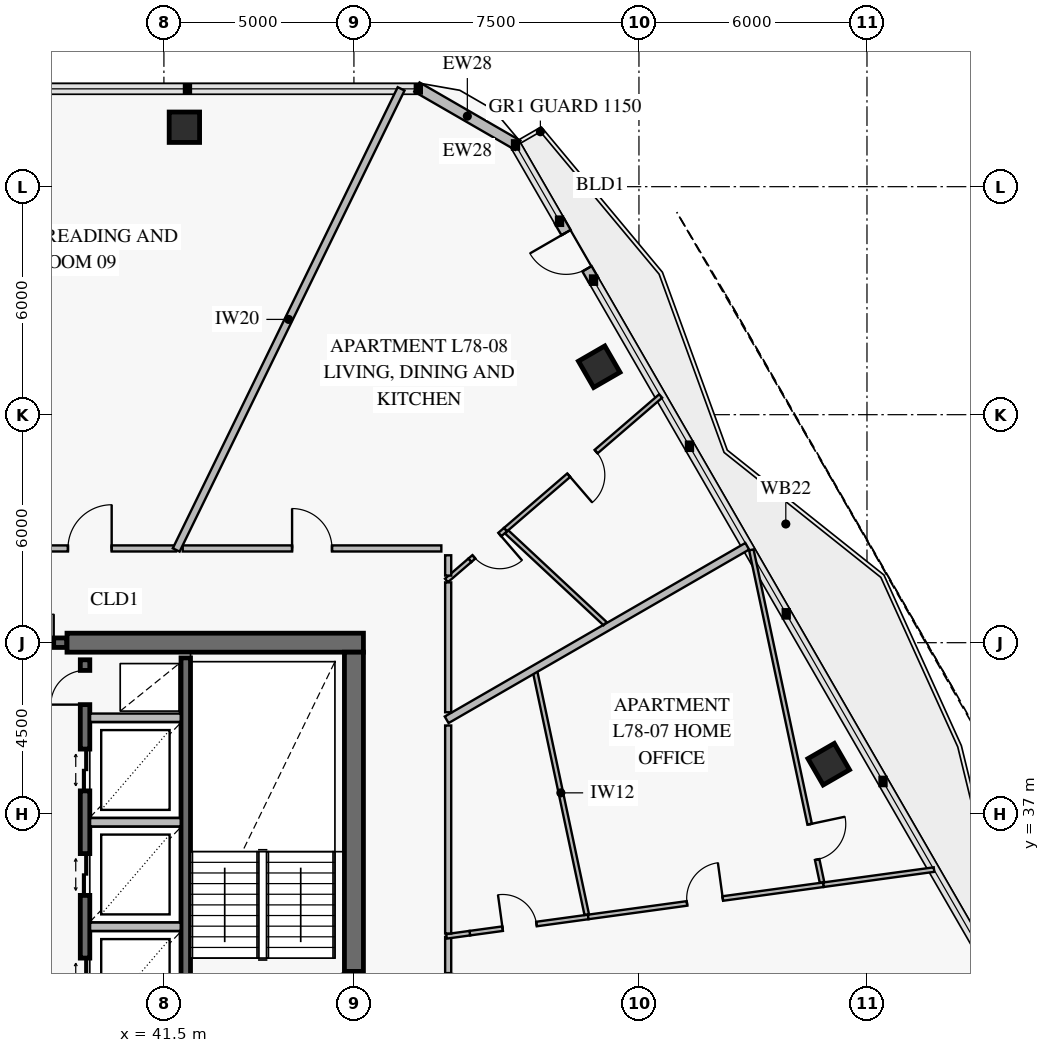
"""IFC4 building model, lengths in metres.
Left out: names, types, materials, properties, quantities, classifications, styles, units other than length and angle.
Written with IfcOpenShell. Run it as: python <this file> out.ifc"""

import sys

from ifc_helpers import new_model, si_unit, direction, frame, frame_2d, origin, origin_2d, place, context, subcontext, project, spatial, rectangle, extrude, element, fill, save


model = new_model("IFC4")
c1 = context("Model", 3, precision=1e-05, world=origin(), true_north=direction((0.0, 1.0)))
c2 = subcontext(c1, "Body", "Model", "MODEL_VIEW")
j1 = project(units=[si_unit("LENGTHUNIT", "METRE"), si_unit("PLANEANGLEUNIT", "RADIAN")], contexts=[c1])
p1 = place(None, origin())
s1 = spatial("IfcSite", under=j1, at=p1, CompositionType="ELEMENT")
p2 = place(p1, origin())
s2 = spatial("IfcBuilding", under=s1, at=p2, CompositionType="ELEMENT")
p3 = place(p2, frame((0.0, 0.0, 308.2)))
s3 = spatial("IfcBuildingStorey", under=s2, at=p3, CompositionType="ELEMENT", Elevation=308.2)
p4 = place(p3, frame((46.75, 41.5, 0.0), z_axis=(0.0, 0.0, 1.0), x_axis=(-1.0, 0.0, 0.0)))
e1 = element("IfcWall", 1, at=p4, inside=s3, PredefinedType="SHEAR", context=c2, shape_type="SweptSolid", body=[
    extrude(rectangle(XDim=7.8, YDim=0.5, at=frame_2d((3.9, 0.0))), origin(), (0.0, 0.0, 1.0), 3.8),
])
p5 = place(p3, frame((46.5, 22.75, 0.0), z_axis=(0.0, 0.0, 1.0), x_axis=(0.0, 1.0, 0.0)))
e2 = element("IfcWall", 2, at=p5, inside=s3, PredefinedType="SHEAR", context=c2, shape_type="SweptSolid", body=[
    extrude(rectangle(XDim=18.5, YDim=0.5, at=frame_2d((9.25, 0.0))), origin(), (0.0, 0.0, 1.0), 3.8),
])
p6 = place(p5, frame((9.0, 0.0, 0.0)))
e3 = element("IfcOpeningElement", 3, at=p6, cuts=e2, PredefinedType="OPENING", context=c2, shape_type="SweptSolid", body=[
    extrude(rectangle(XDim=1.1, YDim=2.15, at=frame_2d((0.55, 1.075))), frame((0.0, 0.262, 0.0), z_axis=(0.0, -1.0, 0.0), x_axis=(1.0, 0.0, 0.0)), (0.0, 0.0, 1.0), 0.524),
])
for number, where, z_axis, x_axis in (
    (4, (58.993, 38.302, 0.0), (0.0, 0.0, 1.0), (-0.5, 0.866, 0.0)),
    (5, (52.955, 48.762, 0.0), (0.0, 0.0, 1.0), (-0.5, 0.866, 0.0)),
    (6, (42.039, 55.064, 0.0), (0.0, 0.0, 1.0), (-1.0, 0.0, 0.0)),
):
    element("IfcColumn", number, at=place(p3, frame(where, z_axis=z_axis, x_axis=x_axis)), inside=s3, PredefinedType="COLUMN", context=c2, shape_type="SweptSolid", body=[
        extrude(rectangle(XDim=0.8, YDim=0.8, at=origin_2d()), origin(), (0.0, 0.0, 1.0), 3.55),
    ])
p7 = place(p3, frame((48.157, 56.122, 0.0), z_axis=(0.0, 0.0, 1.0), x_axis=(0.866023752521, -0.50000286006, 0.0)))
e7 = element("IfcWall", 7, at=p7, inside=s3, PredefinedType="SOLIDWALL", context=c2, shape_type="SweptSolid", body=[
    extrude(rectangle(XDim=3.065, YDim=0.28, at=frame_2d((1.532, 0.0))), origin(), (0.0, 0.0, 1.0), 3.55),
])
p8 = place(p3, frame((51.91, 52.591, 0.0), z_axis=(0.0, 0.0, 1.0), x_axis=(0.499982180423, -0.866035691677, 0.0)))
e8 = element("IfcWall", 8, at=p8, inside=s3, PredefinedType="SOLIDWALL", context=c2, shape_type="SweptSolid", body=[
    extrude(rectangle(XDim=1.79, YDim=0.28, at=frame_2d((0.895, 0.0))), origin(), (0.0, 0.0, 1.0), 3.55),
])
p9 = place(p8, frame((0.345, 0.0, 0.0)))
e9 = element("IfcOpeningElement", 9, at=p9, cuts=e8, PredefinedType="OPENING", context=c2, shape_type="SweptSolid", body=[
    extrude(rectangle(XDim=1.1, YDim=2.2, at=frame_2d((0.55, 1.1))), frame((0.0, 0.152, 0.0), z_axis=(0.0, -1.0, 0.0), x_axis=(1.0, 0.0, 0.0)), (0.0, 0.0, 1.0), 0.304),
])
p10 = place(p3, frame((36.76, 41.5, 0.0), z_axis=(0.0, 0.0, 1.0), x_axis=(1.0, 0.0, 0.0)))
e10 = element("IfcWall", 10, at=p10, inside=s3, PredefinedType="SOLIDWALL", context=c2, shape_type="SweptSolid", body=[
    extrude(rectangle(XDim=2.18, YDim=0.25, at=frame_2d((1.09, 0.0))), origin(), (0.0, 0.0, 1.0), 3.8),
])
p11 = place(p10, frame((0.34, 0.0, 0.0)))
e11 = element("IfcOpeningElement", 11, at=p11, cuts=e10, PredefinedType="OPENING", context=c2, shape_type="SweptSolid", body=[
    extrude(rectangle(XDim=1.5, YDim=2.15, at=frame_2d((0.75, 1.075))), frame((0.0, 0.137, 0.0), z_axis=(0.0, -1.0, 0.0), x_axis=(1.0, 0.0, 0.0)), (0.0, 0.0, 1.0), 0.274),
])
p12 = place(p3, frame((42.075, 31.4, 0.0), z_axis=(0.0, 0.0, 1.0), x_axis=(0.0, 1.0, 0.0)))
e12 = element("IfcWall", 12, at=p12, inside=s3, PredefinedType="SOLIDWALL", context=c2, shape_type="SweptSolid", body=[
    extrude(rectangle(XDim=9.7, YDim=0.25, at=frame_2d((4.85, 0.0))), origin(), (0.0, 0.0, 1.0), 3.8),
])
p13 = place(p3, frame((39.425, 31.4, 0.0), z_axis=(0.0, 0.0, 1.0), x_axis=(0.0, 1.0, 0.0)))
e13 = element("IfcWall", 13, at=p13, inside=s3, PredefinedType="SOLIDWALL", context=c2, shape_type="SweptSolid", body=[
    extrude(rectangle(XDim=9.65, YDim=0.25, at=frame_2d((4.825, 0.0))), origin(), (0.0, 0.0, 1.0), 3.8),
])
p14 = place(p13, frame((0.7, 0.0, 0.0)))
e14 = element("IfcOpeningElement", 14, at=p14, cuts=e13, PredefinedType="OPENING", context=c2, shape_type="SweptSolid", body=[
    extrude(rectangle(XDim=1.1, YDim=2.2, at=frame_2d((0.55, 1.1))), frame((0.0, 0.137, 0.0), z_axis=(0.0, -1.0, 0.0), x_axis=(1.0, 0.0, 0.0)), (0.0, 0.0, 1.0), 0.274),
])
p15 = place(p13, frame((3.45, 0.0, 0.0)))
e15 = element("IfcOpeningElement", 15, at=p15, cuts=e13, PredefinedType="OPENING", context=c2, shape_type="SweptSolid", body=[
    extrude(rectangle(XDim=1.1, YDim=2.2, at=frame_2d((0.55, 1.1))), frame((0.0, 0.137, 0.0), z_axis=(0.0, -1.0, 0.0), x_axis=(1.0, 0.0, 0.0)), (0.0, 0.0, 1.0), 0.274),
])
p16 = place(p13, frame((6.2, 0.0, 0.0)))
e16 = element("IfcOpeningElement", 16, at=p16, cuts=e13, PredefinedType="OPENING", context=c2, shape_type="SweptSolid", body=[
    extrude(rectangle(XDim=1.1, YDim=2.2, at=frame_2d((0.55, 1.1))), frame((0.0, 0.137, 0.0), z_axis=(0.0, -1.0, 0.0), x_axis=(1.0, 0.0, 0.0)), (0.0, 0.0, 1.0), 0.274),
])
p17 = place(p13, frame((8.47, 0.0, 0.0)))
e17 = element("IfcOpeningElement", 17, at=p17, cuts=e13, PredefinedType="OPENING", context=c2, shape_type="SweptSolid", body=[
    extrude(rectangle(XDim=0.9, YDim=2.1, at=frame_2d((0.45, 1.05))), frame((0.0, 0.137, 0.0), z_axis=(0.0, -1.0, 0.0), x_axis=(1.0, 0.0, 0.0)), (0.0, 0.0, 1.0), 0.274),
])
p18 = place(p3, frame((49.55, 33.856, 0.0), z_axis=(0.0, 0.0, 1.0), x_axis=(0.990754403165, 0.135667654987, 0.0)))
e18 = element("IfcWall", 18, at=p18, inside=s3, PredefinedType="PARTITIONING", context=c2, shape_type="SweptSolid", body=[
    extrude(rectangle(XDim=3.144, YDim=0.12, at=frame_2d((1.572, 0.0))), origin(), (0.0, 0.0, 1.0), 3.55),
])
p19 = place(p18, frame((0.87, 0.0, 0.0)))
e19 = element("IfcOpeningElement", 19, at=p19, cuts=e18, PredefinedType="OPENING", context=c2, shape_type="SweptSolid", body=[
    extrude(rectangle(XDim=0.9, YDim=2.1, at=frame_2d((0.45, 1.05))), frame((0.0, 0.072, 0.0), z_axis=(0.0, -1.0, 0.0), x_axis=(1.0, 0.0, 0.0)), (0.0, 0.0, 1.0), 0.144),
])
p20 = place(p3, frame((52.665, 34.283, 0.0), z_axis=(0.0, 0.0, 1.0), x_axis=(0.990745092284, 0.135735633182, 0.0)))
e20 = element("IfcWall", 20, at=p20, inside=s3, PredefinedType="PARTITIONING", context=c2, shape_type="SweptSolid", body=[
    extrude(rectangle(XDim=6.249, YDim=0.12, at=frame_2d((3.124, 0.0))), origin(), (0.0, 0.0, 1.0), 3.55),
])
p21 = place(p20, frame((2.624, 0.0, 0.0)))
e21 = element("IfcOpeningElement", 21, at=p21, cuts=e20, PredefinedType="OPENING", context=c2, shape_type="SweptSolid", body=[
    extrude(rectangle(XDim=0.95, YDim=2.1, at=frame_2d((0.475, 1.05))), frame((0.0, 0.072, 0.0), z_axis=(0.0, -1.0, 0.0), x_axis=(1.0, 0.0, 0.0)), (0.0, 0.0, 1.0), 0.144),
])
p22 = place(p3, frame((58.817, 35.194, 0.0), z_axis=(0.0, 0.0, 1.0), x_axis=(-0.20790706988, 0.978148582933, 0.0)))
e22 = element("IfcWall", 22, at=p22, inside=s3, PredefinedType="PARTITIONING", context=c2, shape_type="SweptSolid", body=[
    extrude(rectangle(XDim=8.945, YDim=0.12, at=frame_2d((4.472, 0.0))), origin(), (0.0, 0.0, 1.0), 2.97),
])
p23 = place(p22, frame((0.613, 0.0, 0.0)))
e23 = element("IfcOpeningElement", 23, at=p23, cuts=e22, PredefinedType="OPENING", context=c2, shape_type="SweptSolid", body=[
    extrude(rectangle(XDim=0.95, YDim=2.1, at=frame_2d((0.475, 1.05))), frame((0.0, 0.072, 0.0), z_axis=(0.0, -1.0, 0.0), x_axis=(1.0, 0.0, 0.0)), (0.0, 0.0, 1.0), 0.144),
])
p24 = place(p3, frame((48.98, 30.8, 0.0), z_axis=(0.0, 0.0, 1.0), x_axis=(0.0, 1.0, 0.0)))
e24 = element("IfcWall", 24, at=p24, inside=s3, PredefinedType="PARTITIONING", context=c2, shape_type="SweptSolid", body=[
    extrude(rectangle(XDim=2.958, YDim=0.16, at=frame_2d((1.479, 0.0))), origin(), (0.0, 0.0, 1.0), 3.55),
])
p25 = place(p24, frame((0.954, 0.0, 0.0)))
e25 = element("IfcOpeningElement", 25, at=p25, cuts=e24, PredefinedType="OPENING", context=c2, shape_type="SweptSolid", body=[
    extrude(rectangle(XDim=1.05, YDim=2.15, at=frame_2d((0.525, 1.075))), frame((0.0, 0.092, 0.0), z_axis=(0.0, -1.0, 0.0), x_axis=(1.0, 0.0, 0.0)), (0.0, 0.0, 1.0), 0.184),
])
p26 = place(p3, frame((49.55, 43.667, 0.0), z_axis=(0.0, 0.0, 1.0), x_axis=(0.757782315792, 0.652507442006, 0.0)))
e26 = element("IfcWall", 26, at=p26, inside=s3, PredefinedType="PARTITIONING", context=c2, shape_type="SweptSolid", body=[
    extrude(rectangle(XDim=1.241, YDim=0.12, at=frame_2d((0.62, 0.0))), origin(), (0.0, 0.0, 1.0), 3.2),
])
p27 = place(p26, frame((0.14, 0.0, 0.0)))
e27 = element("IfcOpeningElement", 27, at=p27, cuts=e26, PredefinedType="OPENING", context=c2, shape_type="SweptSolid", body=[
    extrude(rectangle(XDim=0.9, YDim=2.1, at=frame_2d((0.45, 1.05))), frame((0.0, 0.072, 0.0), z_axis=(0.0, -1.0, 0.0), x_axis=(1.0, 0.0, 0.0)), (0.0, 0.0, 1.0), 0.144),
])
p28 = place(p3, frame((50.49, 44.477, 0.0), z_axis=(0.0, 0.0, 1.0), x_axis=(0.757798689284, 0.65248842635, 0.0)))
e28 = element("IfcWall", 28, at=p28, inside=s3, PredefinedType="PARTITIONING", context=c2, shape_type="SweptSolid", body=[
    extrude(rectangle(XDim=5.385, YDim=0.12, at=frame_2d((2.693, 0.0))), origin(), (0.0, 0.0, 1.0), 2.97),
])
p29 = place(p28, frame((2.193, 0.0, 0.0)))
e29 = element("IfcOpeningElement", 29, at=p29, cuts=e28, PredefinedType="OPENING", context=c2, shape_type="SweptSolid", body=[
    extrude(rectangle(XDim=0.95, YDim=2.1, at=frame_2d((0.475, 1.05))), frame((0.0, 0.072, 0.0), z_axis=(0.0, -1.0, 0.0), x_axis=(1.0, 0.0, 0.0)), (0.0, 0.0, 1.0), 0.144),
])
p30 = place(p3, frame((48.8, 43.98, 0.0), z_axis=(0.0, 0.0, 1.0), x_axis=(-1.0, 0.0, 0.0)))
e30 = element("IfcWall", 30, at=p30, inside=s3, PredefinedType="PARTITIONING", context=c2, shape_type="SweptSolid", body=[
    extrude(rectangle(XDim=6.805, YDim=0.16, at=frame_2d((3.402, 0.0))), origin(), (0.0, 0.0, 1.0), 3.0),
])
p31 = place(p30, frame((2.877, 0.0, 0.0)))
e31 = element("IfcOpeningElement", 31, at=p31, cuts=e30, PredefinedType="OPENING", context=c2, shape_type="SweptSolid", body=[
    extrude(rectangle(XDim=1.05, YDim=2.15, at=frame_2d((0.525, 1.075))), frame((0.0, 0.092, 0.0), z_axis=(0.0, -1.0, 0.0), x_axis=(1.0, 0.0, 0.0)), (0.0, 0.0, 1.0), 0.184),
])
p32 = place(p3, frame((41.821, 43.98, 0.0), z_axis=(0.0, 0.0, 1.0), x_axis=(-1.0, 0.0, 0.0)))
e32 = element("IfcWall", 32, at=p32, inside=s3, PredefinedType="PARTITIONING", context=c2, shape_type="SweptSolid", body=[
    extrude(rectangle(XDim=4.541, YDim=0.16, at=frame_2d((2.271, 0.0))), origin(), (0.0, 0.0, 1.0), 3.0),
])
p33 = place(p32, frame((1.695, 0.0, 0.0)))
e33 = element("IfcOpeningElement", 33, at=p33, cuts=e32, PredefinedType="OPENING", context=c2, shape_type="SweptSolid", body=[
    extrude(rectangle(XDim=1.15, YDim=2.2, at=frame_2d((0.575, 1.1))), frame((0.0, 0.092, 0.0), z_axis=(0.0, -1.0, 0.0), x_axis=(1.0, 0.0, 0.0)), (0.0, 0.0, 1.0), 0.184),
])
for number, where, z_axis, x_axis in (
    (34, (39.558, 34.025, 0.0), (0.0, 0.0, 1.0), (1.0, 0.0, 0.0)),
    (35, (39.558, 36.775, 0.0), (0.0, 0.0, 1.0), (1.0, 0.0, 0.0)),
    (36, (39.558, 39.525, 0.0), (0.0, 0.0, 1.0), (1.0, 0.0, 0.0)),
):
    element("IfcWall", number, at=place(p3, frame(where, z_axis=z_axis, x_axis=x_axis)), inside=s3, PredefinedType="PARTITIONING", context=c2, shape_type="SweptSolid", body=[
        extrude(rectangle(XDim=2.384, YDim=0.22, at=frame_2d((1.192, 0.0))), origin(), (0.0, 0.0, 1.0), 3.55),
    ])
p34 = place(p3, frame((48.935, 33.772, 0.0), z_axis=(0.0, 0.0, 1.0), x_axis=(0.990743771345, 0.135745274469, 0.0)))
e37 = element("IfcWall", 37, at=p34, inside=s3, PredefinedType="PARTITIONING", context=c2, shape_type="SweptSolid", body=[
    extrude(rectangle(XDim=0.621, YDim=0.12, at=frame_2d((0.31, 0.0))), origin(), (0.0, 0.0, 1.0), 3.55),
])
p35 = place(p3, frame((58.855, 35.131, 0.0), z_axis=(0.0, 0.0, 1.0), x_axis=(0.990749539567, 0.135703168156, 0.0)))
e38 = element("IfcWall", 38, at=p35, inside=s3, PredefinedType="PARTITIONING", context=c2, shape_type="SweptSolid", body=[
    extrude(rectangle(XDim=2.936, YDim=0.12, at=frame_2d((1.468, 0.0))), origin(), (0.0, 0.0, 1.0), 2.97),
])
p36 = place(p3, frame((52.626, 34.346, 0.0), z_axis=(0.0, 0.0, 1.0), x_axis=(-0.207896658566, 0.978150795817, 0.0)))
e39 = element("IfcWall", 39, at=p36, inside=s3, PredefinedType="PARTITIONING", context=c2, shape_type="SweptSolid", body=[
    extrude(rectangle(XDim=6.548, YDim=0.12, at=frame_2d((3.274, 0.0))), origin(), (0.0, 0.0, 1.0), 3.0),
])
p37 = place(p3, frame((48.94, 39.471, 0.0), z_axis=(0.0, 0.0, 1.0), x_axis=(0.866028436312, 0.499994747472, 0.0)))
e40 = element("IfcWall", 40, at=p37, inside=s3, PredefinedType="PARTITIONING", context=c2, shape_type="SweptSolid", body=[
    extrude(rectangle(XDim=9.132, YDim=0.2, at=frame_2d((4.566, 0.0))), origin(), (0.0, 0.0, 1.0), 2.97),
])
p38 = place(p3, frame((48.935, 43.138, 0.0), z_axis=(0.0, 0.0, 1.0), x_axis=(0.757789461508, 0.652499143315, 0.0)))
e41 = element("IfcWall", 41, at=p38, inside=s3, PredefinedType="PARTITIONING", context=c2, shape_type="SweptSolid", body=[
    extrude(rectangle(XDim=0.812, YDim=0.12, at=frame_2d((0.406, 0.0))), origin(), (0.0, 0.0, 1.0), 3.55),
])
p39 = place(p3, frame((53.108, 42.002, 0.0), z_axis=(0.0, 0.0, 1.0), x_axis=(-0.731321501002, 0.682032889362, 0.0)))
e42 = element("IfcWall", 42, at=p39, inside=s3, PredefinedType="PARTITIONING", context=c2, shape_type="SweptSolid", body=[
    extrude(rectangle(XDim=3.537, YDim=0.12, at=frame_2d((1.768, 0.0))), origin(), (0.0, 0.0, 1.0), 3.55),
])
p40 = place(p3, frame((41.823, 43.94, 0.0), z_axis=(0.0, 0.0, 1.0), x_axis=(0.438366981634, 0.898796077769, 0.0)))
e43 = element("IfcWall", 43, at=p40, inside=s3, PredefinedType="PARTITIONING", context=c2, shape_type="SweptSolid", body=[
    extrude(rectangle(XDim=13.5, YDim=0.2, at=frame_2d((6.75, 0.0))), origin(), (0.0, 0.0, 1.0), 2.97),
])
p41 = place(p3, frame((48.98, 33.847, 0.0), z_axis=(0.0, 0.0, 1.0), x_axis=(0.0, 1.0, 0.0)))
e44 = element("IfcWall", 44, at=p41, inside=s3, PredefinedType="PARTITIONING", context=c2, shape_type="SweptSolid", body=[
    extrude(rectangle(XDim=5.474, YDim=0.16, at=frame_2d((2.737, 0.0))), origin(), (0.0, 0.0, 1.0), 3.0),
])
p42 = place(p3, frame((48.98, 43.266, 0.0), z_axis=(0.0, 0.0, 1.0), x_axis=(0.0, 1.0, 0.0)))
e45 = element("IfcWall", 45, at=p42, inside=s3, PredefinedType="PARTITIONING", context=c2, shape_type="SweptSolid", body=[
    extrude(rectangle(XDim=0.534, YDim=0.16, at=frame_2d((0.267, 0.0))), origin(), (0.0, 0.0, 1.0), 3.55),
])
p43 = place(p3, frame((48.98, 39.669, 0.0), z_axis=(0.0, 0.0, 1.0), x_axis=(0.0, 1.0, 0.0)))
e46 = element("IfcWall", 46, at=p43, inside=s3, PredefinedType="PARTITIONING", context=c2, shape_type="SweptSolid", body=[
    extrude(rectangle(XDim=3.418, YDim=0.16, at=frame_2d((1.709, 0.0))), origin(), (0.0, 0.0, 1.0), 3.55),
])
p44 = place(p9, frame((1.1, 0.0, 0.0), z_axis=(0.0, 0.0, 1.0), x_axis=(-1.0, 0.0, 0.0)))
e47 = element("IfcDoor", 47, at=p44, inside=s3, OperationType="SINGLE_SWING_RIGHT", PredefinedType="DOOR", context=c2, shape_type="SweptSolid", body=[
    extrude(rectangle(XDim=1.1, YDim=2.2, at=frame_2d((0.55, 1.1))), frame((0.0, 0.025, 0.0), z_axis=(0.0, -1.0, 0.0), x_axis=(1.0, 0.0, 0.0)), (0.0, 0.0, 1.0), 0.05),
])
fill(e9, e47)
p45 = place(p6, origin())
e48 = element("IfcDoor", 48, at=p45, inside=s3, OperationType="SINGLE_SWING_LEFT", PredefinedType="USERDEFINED", context=c2, shape_type="SweptSolid", body=[
    extrude(rectangle(XDim=1.1, YDim=2.15, at=frame_2d((0.55, 1.075))), frame((0.0, 0.025, 0.0), z_axis=(0.0, -1.0, 0.0), x_axis=(1.0, 0.0, 0.0)), (0.0, 0.0, 1.0), 0.05),
])
fill(e3, e48)
p46 = place(p11, origin())
e49 = element("IfcDoor", 49, at=p46, inside=s3, OperationType="DOUBLE_DOOR_SINGLE_SWING", PredefinedType="DOOR", context=c2, shape_type="SweptSolid", body=[
    extrude(rectangle(XDim=1.5, YDim=2.15, at=frame_2d((0.75, 1.075))), frame((0.0, 0.025, 0.0), z_axis=(0.0, -1.0, 0.0), x_axis=(1.0, 0.0, 0.0)), (0.0, 0.0, 1.0), 0.05),
])
fill(e11, e49)
p47 = place(p14, origin())
e50 = element("IfcDoor", 50, at=p47, inside=s3, OperationType="DOUBLE_DOOR_SLIDING", PredefinedType="DOOR", context=c2, shape_type="SweptSolid", body=[
    extrude(rectangle(XDim=1.1, YDim=2.2, at=frame_2d((0.55, 1.1))), frame((0.0, 0.025, 0.0), z_axis=(0.0, -1.0, 0.0), x_axis=(1.0, 0.0, 0.0)), (0.0, 0.0, 1.0), 0.05),
])
fill(e14, e50)
p48 = place(p15, origin())
e51 = element("IfcDoor", 51, at=p48, inside=s3, OperationType="DOUBLE_DOOR_SLIDING", PredefinedType="DOOR", context=c2, shape_type="SweptSolid", body=[
    extrude(rectangle(XDim=1.1, YDim=2.2, at=frame_2d((0.55, 1.1))), frame((0.0, 0.025, 0.0), z_axis=(0.0, -1.0, 0.0), x_axis=(1.0, 0.0, 0.0)), (0.0, 0.0, 1.0), 0.05),
])
fill(e15, e51)
p49 = place(p16, origin())
e52 = element("IfcDoor", 52, at=p49, inside=s3, OperationType="DOUBLE_DOOR_SLIDING", PredefinedType="DOOR", context=c2, shape_type="SweptSolid", body=[
    extrude(rectangle(XDim=1.1, YDim=2.2, at=frame_2d((0.55, 1.1))), frame((0.0, 0.025, 0.0), z_axis=(0.0, -1.0, 0.0), x_axis=(1.0, 0.0, 0.0)), (0.0, 0.0, 1.0), 0.05),
])
fill(e16, e52)
p50 = place(p17, origin())
e53 = element("IfcDoor", 53, at=p50, inside=s3, OperationType="SINGLE_SWING_LEFT", PredefinedType="DOOR", context=c2, shape_type="SweptSolid", body=[
    extrude(rectangle(XDim=0.9, YDim=2.1, at=frame_2d((0.45, 1.05))), frame((0.0, 0.025, 0.0), z_axis=(0.0, -1.0, 0.0), x_axis=(1.0, 0.0, 0.0)), (0.0, 0.0, 1.0), 0.05),
])
fill(e17, e53)
p51 = place(p19, origin())
e54 = element("IfcDoor", 54, at=p51, inside=s3, OperationType="SINGLE_SWING_LEFT", PredefinedType="DOOR", context=c2, shape_type="SweptSolid", body=[
    extrude(rectangle(XDim=0.9, YDim=2.1, at=frame_2d((0.45, 1.05))), frame((0.0, 0.025, 0.0), z_axis=(0.0, -1.0, 0.0), x_axis=(1.0, 0.0, 0.0)), (0.0, 0.0, 1.0), 0.05),
])
fill(e19, e54)
p52 = place(p21, origin())
e55 = element("IfcDoor", 55, at=p52, inside=s3, OperationType="SINGLE_SWING_RIGHT", PredefinedType="DOOR", context=c2, shape_type="SweptSolid", body=[
    extrude(rectangle(XDim=0.95, YDim=2.1, at=frame_2d((0.475, 1.05))), frame((0.0, 0.025, 0.0), z_axis=(0.0, -1.0, 0.0), x_axis=(1.0, 0.0, 0.0)), (0.0, 0.0, 1.0), 0.05),
])
fill(e21, e55)
p53 = place(p23, frame((0.95, 0.0, 0.0), z_axis=(0.0, 0.0, 1.0), x_axis=(-1.0, 0.0, 0.0)))
e56 = element("IfcDoor", 56, at=p53, inside=s3, OperationType="SINGLE_SWING_LEFT", PredefinedType="DOOR", context=c2, shape_type="SweptSolid", body=[
    extrude(rectangle(XDim=0.95, YDim=2.1, at=frame_2d((0.475, 1.05))), frame((0.0, 0.025, 0.0), z_axis=(0.0, -1.0, 0.0), x_axis=(1.0, 0.0, 0.0)), (0.0, 0.0, 1.0), 0.05),
])
fill(e23, e56)
p54 = place(p25, frame((1.05, 0.0, 0.0), z_axis=(0.0, 0.0, 1.0), x_axis=(-1.0, 0.0, 0.0)))
e57 = element("IfcDoor", 57, at=p54, inside=s3, OperationType="SINGLE_SWING_RIGHT", PredefinedType="DOOR", context=c2, shape_type="SweptSolid", body=[
    extrude(rectangle(XDim=1.05, YDim=2.15, at=frame_2d((0.525, 1.075))), frame((0.0, 0.025, 0.0), z_axis=(0.0, -1.0, 0.0), x_axis=(1.0, 0.0, 0.0)), (0.0, 0.0, 1.0), 0.05),
])
fill(e25, e57)
p55 = place(p27, frame((0.9, 0.0, 0.0), z_axis=(0.0, 0.0, 1.0), x_axis=(-1.0, 0.0, 0.0)))
e58 = element("IfcDoor", 58, at=p55, inside=s3, OperationType="SINGLE_SWING_LEFT", PredefinedType="DOOR", context=c2, shape_type="SweptSolid", body=[
    extrude(rectangle(XDim=0.9, YDim=2.1, at=frame_2d((0.45, 1.05))), frame((0.0, 0.025, 0.0), z_axis=(0.0, -1.0, 0.0), x_axis=(1.0, 0.0, 0.0)), (0.0, 0.0, 1.0), 0.05),
])
fill(e27, e58)
p56 = place(p29, frame((0.95, 0.0, 0.0), z_axis=(0.0, 0.0, 1.0), x_axis=(-1.0, 0.0, 0.0)))
e59 = element("IfcDoor", 59, at=p56, inside=s3, OperationType="SINGLE_SWING_RIGHT", PredefinedType="DOOR", context=c2, shape_type="SweptSolid", body=[
    extrude(rectangle(XDim=0.95, YDim=2.1, at=frame_2d((0.475, 1.05))), frame((0.0, 0.025, 0.0), z_axis=(0.0, -1.0, 0.0), x_axis=(1.0, 0.0, 0.0)), (0.0, 0.0, 1.0), 0.05),
])
fill(e29, e59)
p57 = place(p31, frame((1.05, 0.0, 0.0), z_axis=(0.0, 0.0, 1.0), x_axis=(-1.0, 0.0, 0.0)))
e60 = element("IfcDoor", 60, at=p57, inside=s3, OperationType="SINGLE_SWING_LEFT", PredefinedType="DOOR", context=c2, shape_type="SweptSolid", body=[
    extrude(rectangle(XDim=1.05, YDim=2.15, at=frame_2d((0.525, 1.075))), frame((0.0, 0.025, 0.0), z_axis=(0.0, -1.0, 0.0), x_axis=(1.0, 0.0, 0.0)), (0.0, 0.0, 1.0), 0.05),
])
fill(e31, e60)
p58 = place(p33, frame((1.15, 0.0, 0.0), z_axis=(0.0, 0.0, 1.0), x_axis=(-1.0, 0.0, 0.0)))
e61 = element("IfcDoor", 61, at=p58, inside=s3, OperationType="SINGLE_SWING_RIGHT", PredefinedType="DOOR", context=c2, shape_type="SweptSolid", body=[
    extrude(rectangle(XDim=1.15, YDim=2.2, at=frame_2d((0.575, 1.1))), frame((0.0, 0.025, 0.0), z_axis=(0.0, -1.0, 0.0), x_axis=(1.0, 0.0, 0.0)), (0.0, 0.0, 1.0), 0.05),
])
fill(e33, e61)
save(model, sys.argv[1])
